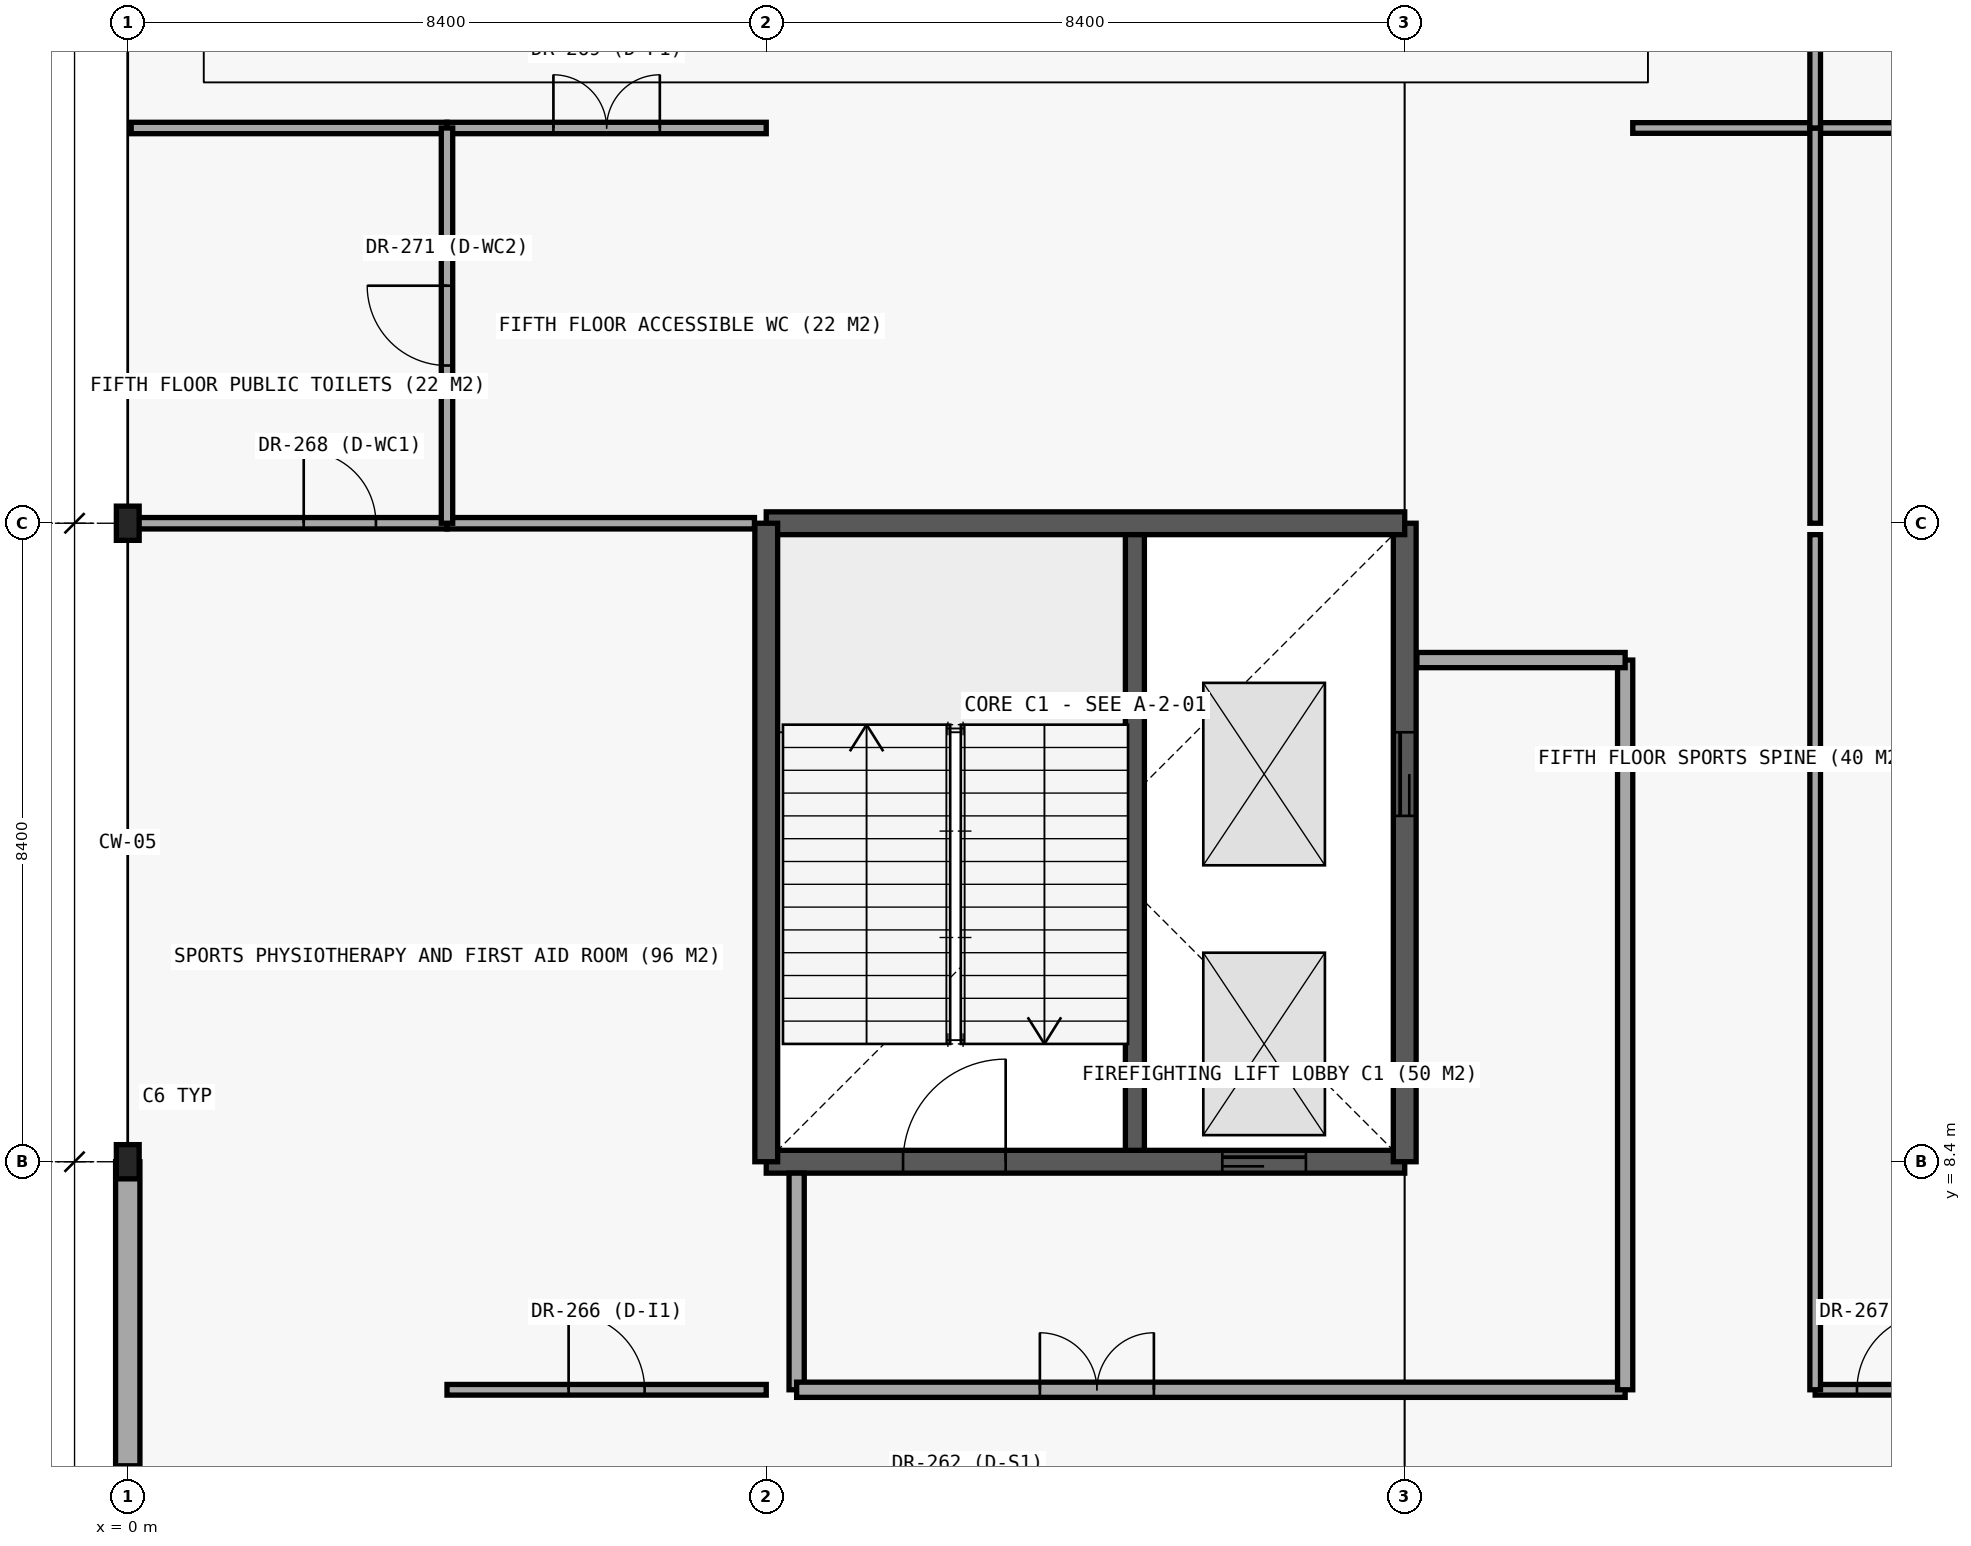
"""IFC4 building model, lengths in metres.
Left out: names, types, materials, properties, quantities, classifications, styles, units other than length and angle.
Written with IfcOpenShell. Run it as: python <this file> out.ifc"""

import sys

from ifc_helpers import new_model, si_unit, direction, frame, frame_2d, origin, origin_2d, place, context, subcontext, project, spatial, rectangle, i_section, extrude, element, fill, save


model = new_model("IFC4")
c1 = context("Model", 3, precision=1e-05, world=origin(), true_north=direction((0.0, 1.0)))
c2 = subcontext(c1, "Body", "Model", "MODEL_VIEW")
j1 = project(units=[si_unit("LENGTHUNIT", "METRE"), si_unit("PLANEANGLEUNIT", "RADIAN")], contexts=[c1])
p1 = place(None, origin())
s1 = spatial("IfcSite", under=j1, at=p1, CompositionType="ELEMENT")
p2 = place(p1, origin())
s2 = spatial("IfcBuilding", under=s1, at=p2, CompositionType="ELEMENT")
p3 = place(p2, frame((0.0, 0.0, 21.6)))
s3 = spatial("IfcBuildingStorey", under=s2, at=p3, CompositionType="ELEMENT", Elevation=21.6)
p4 = place(p3, frame((8.4, 8.4, 0.0), z_axis=(0.0, 0.0, 1.0), x_axis=(1.0, 0.0, 0.0)))
e1 = element("IfcWall", 1, at=p4, inside=s3, PredefinedType="SHEAR", context=c2, shape_type="SweptSolid", body=[
    extrude(rectangle(XDim=8.4, YDim=0.3, at=frame_2d((4.2, 0.0))), origin(), (0.0, 0.0, 1.0), 4.8),
])
p5 = place(p4, frame((1.8, 0.0, 0.0)))
e2 = element("IfcOpeningElement", 2, at=p5, cuts=e1, PredefinedType="OPENING", context=c2, shape_type="SweptSolid", body=[
    extrude(rectangle(XDim=1.35, YDim=2.2, at=frame_2d((0.675, 1.1))), frame((0.0, 0.16, 0.0), z_axis=(0.0, -1.0, 0.0), x_axis=(1.0, 0.0, 0.0)), (0.0, 0.0, 1.0), 0.32),
])
p6 = place(p4, frame((6.0, 0.0, 0.0)))
e3 = element("IfcOpeningElement", 3, at=p6, cuts=e1, PredefinedType="OPENING", context=c2, shape_type="SweptSolid", body=[
    extrude(rectangle(XDim=1.1, YDim=2.2, at=frame_2d((0.55, 1.1))), frame((0.0, 0.16, 0.0), z_axis=(0.0, -1.0, 0.0), x_axis=(1.0, 0.0, 0.0)), (0.0, 0.0, 1.0), 0.32),
])
p7 = place(p3, frame((16.8, 8.4, 0.0), z_axis=(0.0, 0.0, 1.0), x_axis=(0.0, 1.0, 0.0)))
e4 = element("IfcWall", 4, at=p7, inside=s3, PredefinedType="SHEAR", context=c2, shape_type="SweptSolid", body=[
    extrude(rectangle(XDim=8.4, YDim=0.3, at=frame_2d((4.2, 0.0))), origin(), (0.0, 0.0, 1.0), 4.8),
])
p8 = place(p7, frame((4.55, 0.0, 0.0)))
e5 = element("IfcOpeningElement", 5, at=p8, cuts=e4, PredefinedType="OPENING", context=c2, shape_type="SweptSolid", body=[
    extrude(rectangle(XDim=1.1, YDim=2.2, at=frame_2d((0.55, 1.1))), frame((0.0, 0.16, 0.0), z_axis=(0.0, -1.0, 0.0), x_axis=(1.0, 0.0, 0.0)), (0.0, 0.0, 1.0), 0.32),
])
for number, where, z_axis, x_axis in (
    (6, (16.8, 16.8, 0.0), (0.0, 0.0, 1.0), (-1.0, 0.0, 0.0)),
    (7, (8.4, 16.8, 0.0), (0.0, 0.0, 1.0), (0.0, -1.0, 0.0)),
):
    element("IfcWall", number, at=place(p3, frame(where, z_axis=z_axis, x_axis=x_axis)), inside=s3, PredefinedType="SHEAR", context=c2, shape_type="SweptSolid", body=[
        extrude(rectangle(XDim=8.4, YDim=0.3, at=frame_2d((4.2, 0.0))), origin(), (0.0, 0.0, 1.0), 4.8),
    ])
p9 = place(p3, frame((13.25, 8.55, 0.0), z_axis=(0.0, 0.0, 1.0), x_axis=(0.0, 1.0, 0.0)))
e8 = element("IfcWall", 8, at=p9, inside=s3, PredefinedType="SHEAR", context=c2, shape_type="SweptSolid", body=[
    extrude(rectangle(XDim=8.1, YDim=0.25, at=frame_2d((4.05, 0.0))), origin(), (0.0, 0.0, 1.0), 4.8),
])
for number, where, z_axis, x_axis in (
    (9, (0.0, 8.4, 0.0), (0.0, 0.0, 1.0), (1.0, 0.0, 0.0)),
    (10, (0.0, 16.8, 0.0), (0.0, 0.0, 1.0), (1.0, 0.0, 0.0)),
):
    element("IfcColumn", number, at=place(p3, frame(where, z_axis=z_axis, x_axis=x_axis)), inside=s3, PredefinedType="COLUMN", context=c2, shape_type="SweptSolid", body=[
        extrude(i_section(OverallWidth=0.3, OverallDepth=0.45, WebThickness=0.014, FlangeThickness=0.026, FilletRadius=0.027, at=origin_2d()), origin(), (0.0, 0.0, 1.0), 4.8),
    ])
p10 = place(p3, frame((0.0, 8.4, 0.0), z_axis=(0.0, 0.0, 1.0), x_axis=(0.0, -1.0, 0.0)))
e11 = element("IfcWall", 11, at=p10, inside=s3, PredefinedType="STANDARD", context=c2, shape_type="SweptSolid", body=[
    extrude(rectangle(XDim=4.2, YDim=0.32, at=frame_2d((2.1, 0.0))), origin(), (0.0, 0.0, 1.0), 4.22),
])
p11 = place(p3, frame((8.8, 5.4, 0.0), z_axis=(0.0, 0.0, 1.0), x_axis=(0.0, 1.0, 0.0)))
e12 = element("IfcWall", 12, at=p11, inside=s3, PredefinedType="PARTITIONING", context=c2, shape_type="SweptSolid", body=[
    extrude(rectangle(XDim=2.85, YDim=0.2, at=frame_2d((1.425, 0.0))), origin(), (0.0, 0.0, 1.0), 4.12),
])
p12 = place(p3, frame((8.8, 5.4, 0.0), z_axis=(0.0, 0.0, 1.0), x_axis=(1.0, 0.0, 0.0)))
e13 = element("IfcWall", 13, at=p12, inside=s3, PredefinedType="PARTITIONING", context=c2, shape_type="SweptSolid", body=[
    extrude(rectangle(XDim=10.9, YDim=0.2, at=frame_2d((5.45, 0.0))), origin(), (0.0, 0.0, 1.0), 4.12),
])
p13 = place(p12, frame((3.2, 0.0, 0.0)))
e14 = element("IfcOpeningElement", 14, at=p13, cuts=e13, PredefinedType="OPENING", context=c2, shape_type="SweptSolid", body=[
    extrude(rectangle(XDim=1.5, YDim=2.2, at=frame_2d((0.75, 1.1))), frame((0.0, 0.11, 0.0), z_axis=(0.0, -1.0, 0.0), x_axis=(1.0, 0.0, 0.0)), (0.0, 0.0, 1.0), 0.22),
])
p14 = place(p3, frame((19.7, 5.4, 0.0), z_axis=(0.0, 0.0, 1.0), x_axis=(0.0, 1.0, 0.0)))
e15 = element("IfcWall", 15, at=p14, inside=s3, PredefinedType="PARTITIONING", context=c2, shape_type="SweptSolid", body=[
    extrude(rectangle(XDim=9.6, YDim=0.2, at=frame_2d((4.8, 0.0))), origin(), (0.0, 0.0, 1.0), 4.12),
])
p15 = place(p3, frame((16.96, 15.0, 0.0), z_axis=(0.0, 0.0, 1.0), x_axis=(1.0, 0.0, 0.0)))
e16 = element("IfcWall", 16, at=p15, inside=s3, PredefinedType="PARTITIONING", context=c2, shape_type="SweptSolid", body=[
    extrude(rectangle(XDim=2.74, YDim=0.2, at=frame_2d((1.37, 0.0))), origin(), (0.0, 0.0, 1.0), 4.12),
])
p16 = place(p3, frame((4.2, 5.4, 0.0), z_axis=(0.0, 0.0, 1.0), x_axis=(1.0, 0.0, 0.0)))
e17 = element("IfcWall", 17, at=p16, inside=s3, PredefinedType="PARTITIONING", context=c2, shape_type="SweptSolid", body=[
    extrude(rectangle(XDim=4.2, YDim=0.14, at=frame_2d((2.1, 0.0))), origin(), (0.0, 0.0, 1.0), 4.1),
])
p17 = place(p16, frame((1.6, 0.0, 0.0)))
e18 = element("IfcOpeningElement", 18, at=p17, cuts=e17, PredefinedType="OPENING", context=c2, shape_type="SweptSolid", body=[
    extrude(rectangle(XDim=1.0, YDim=2.15, at=frame_2d((0.5, 1.075))), frame((0.0, 0.08, 0.0), z_axis=(0.0, -1.0, 0.0), x_axis=(1.0, 0.0, 0.0)), (0.0, 0.0, 1.0), 0.16),
])
p18 = place(p3, frame((22.2, 5.4, 0.0), z_axis=(0.0, 0.0, 1.0), x_axis=(1.0, 0.0, 0.0)))
e19 = element("IfcWall", 19, at=p18, inside=s3, PredefinedType="PARTITIONING", context=c2, shape_type="SweptSolid", body=[
    extrude(rectangle(XDim=11.4, YDim=0.14, at=frame_2d((5.7, 0.0))), origin(), (0.0, 0.0, 1.0), 4.1),
])
p19 = place(p18, frame((0.55, 0.0, 0.0)))
e20 = element("IfcOpeningElement", 20, at=p19, cuts=e19, PredefinedType="OPENING", context=c2, shape_type="SweptSolid", body=[
    extrude(rectangle(XDim=1.0, YDim=2.15, at=frame_2d((0.5, 1.075))), frame((0.0, 0.08, 0.0), z_axis=(0.0, -1.0, 0.0), x_axis=(1.0, 0.0, 0.0)), (0.0, 0.0, 1.0), 0.16),
])
p20 = place(p3, frame((0.045, 16.8, 0.0), z_axis=(0.0, 0.0, 1.0), x_axis=(1.0, 0.0, 0.0)))
e21 = element("IfcWall", 21, at=p20, inside=s3, PredefinedType="PARTITIONING", context=c2, shape_type="SweptSolid", body=[
    extrude(rectangle(XDim=4.155, YDim=0.15, at=frame_2d((2.078, 0.0))), origin(), (0.0, 0.0, 1.0), 3.9),
])
p21 = place(p20, frame((2.27, 0.0, 0.0)))
e22 = element("IfcOpeningElement", 22, at=p21, cuts=e21, PredefinedType="OPENING", context=c2, shape_type="SweptSolid", body=[
    extrude(rectangle(XDim=0.95, YDim=2.1, at=frame_2d((0.475, 1.05))), frame((0.0, 0.085, 0.0), z_axis=(0.0, -1.0, 0.0), x_axis=(1.0, 0.0, 0.0)), (0.0, 0.0, 1.0), 0.17),
])
p22 = place(p3, frame((4.2, 16.8, 0.0), z_axis=(0.0, 0.0, 1.0), x_axis=(1.0, 0.0, 0.0)))
e23 = element("IfcWall", 23, at=p22, inside=s3, PredefinedType="PARTITIONING", context=c2, shape_type="SweptSolid", body=[
    extrude(rectangle(XDim=4.045, YDim=0.15, at=frame_2d((2.022, 0.0))), origin(), (0.0, 0.0, 1.0), 3.9),
])
p23 = place(p3, frame((0.045, 22.0, 0.0), z_axis=(0.0, 0.0, 1.0), x_axis=(1.0, 0.0, 0.0)))
e24 = element("IfcWall", 24, at=p23, inside=s3, PredefinedType="PARTITIONING", context=c2, shape_type="SweptSolid", body=[
    extrude(rectangle(XDim=4.155, YDim=0.15, at=frame_2d((2.078, 0.0))), origin(), (0.0, 0.0, 1.0), 4.1),
])
p24 = place(p3, frame((4.2, 22.0, 0.0), z_axis=(0.0, 0.0, 1.0), x_axis=(1.0, 0.0, 0.0)))
e25 = element("IfcWall", 25, at=p24, inside=s3, PredefinedType="PARTITIONING", context=c2, shape_type="SweptSolid", body=[
    extrude(rectangle(XDim=4.2, YDim=0.15, at=frame_2d((2.1, 0.0))), origin(), (0.0, 0.0, 1.0), 4.1),
])
p25 = place(p24, frame((1.4, 0.0, 0.0)))
e26 = element("IfcOpeningElement", 26, at=p25, cuts=e25, PredefinedType="OPENING", context=c2, shape_type="SweptSolid", body=[
    extrude(rectangle(XDim=1.4, YDim=2.25, at=frame_2d((0.7, 1.125))), frame((0.0, 0.085, 0.0), z_axis=(0.0, -1.0, 0.0), x_axis=(1.0, 0.0, 0.0)), (0.0, 0.0, 1.0), 0.17),
])
p26 = place(p3, frame((19.8, 22.0, 0.0), z_axis=(0.0, 0.0, 1.0), x_axis=(1.0, 0.0, 0.0)))
e27 = element("IfcWall", 27, at=p26, inside=s3, PredefinedType="PARTITIONING", context=c2, shape_type="SweptSolid", body=[
    extrude(rectangle(XDim=2.4, YDim=0.14, at=frame_2d((1.2, 0.0))), origin(), (0.0, 0.0, 1.0), 4.1),
])
p27 = place(p3, frame((22.2, 22.0, 0.0), z_axis=(0.0, 0.0, 1.0), x_axis=(1.0, 0.0, 0.0)))
e28 = element("IfcWall", 28, at=p27, inside=s3, PredefinedType="PARTITIONING", context=c2, shape_type="SweptSolid", body=[
    extrude(rectangle(XDim=11.4, YDim=0.14, at=frame_2d((5.7, 0.0))), origin(), (0.0, 0.0, 1.0), 4.1),
])
p28 = place(p3, frame((4.2, 16.8, 0.0), z_axis=(0.0, 0.0, 1.0), x_axis=(0.0, 1.0, 0.0)))
e29 = element("IfcWall", 29, at=p28, inside=s3, PredefinedType="PARTITIONING", context=c2, shape_type="SweptSolid", body=[
    extrude(rectangle(XDim=5.2, YDim=0.15, at=frame_2d((2.6, 0.0))), origin(), (0.0, 0.0, 1.0), 4.1),
])
p29 = place(p28, frame((2.075, 0.0, 0.0)))
e30 = element("IfcOpeningElement", 30, at=p29, cuts=e29, PredefinedType="OPENING", context=c2, shape_type="SweptSolid", body=[
    extrude(rectangle(XDim=1.05, YDim=2.15, at=frame_2d((0.525, 1.075))), frame((0.0, 0.085, 0.0), z_axis=(0.0, -1.0, 0.0), x_axis=(1.0, 0.0, 0.0)), (0.0, 0.0, 1.0), 0.17),
])
p30 = place(p3, frame((22.2, 5.4, 0.0), z_axis=(0.0, 0.0, 1.0), x_axis=(0.0, 1.0, 0.0)))
e31 = element("IfcWall", 31, at=p30, inside=s3, PredefinedType="PARTITIONING", context=c2, shape_type="SweptSolid", body=[
    extrude(rectangle(XDim=11.25, YDim=0.14, at=frame_2d((5.625, 0.0))), origin(), (0.0, 0.0, 1.0), 4.1),
])
p31 = place(p3, frame((22.2, 16.8, 0.0), z_axis=(0.0, 0.0, 1.0), x_axis=(0.0, 1.0, 0.0)))
e32 = element("IfcWall", 32, at=p31, inside=s3, PredefinedType="PARTITIONING", context=c2, shape_type="SweptSolid", body=[
    extrude(rectangle(XDim=5.2, YDim=0.14, at=frame_2d((2.6, 0.0))), origin(), (0.0, 0.0, 1.0), 4.1),
])
p32 = place(p3, frame((22.2, 22.0, 0.0), z_axis=(0.0, 0.0, 1.0), x_axis=(0.0, 1.0, 0.0)))
e33 = element("IfcWall", 33, at=p32, inside=s3, PredefinedType="PARTITIONING", context=c2, shape_type="SweptSolid", body=[
    extrude(rectangle(XDim=11.6, YDim=0.14, at=frame_2d((5.8, 0.0))), origin(), (0.0, 0.0, 1.0), 4.1),
])
p33 = place(p32, frame((5.1, 0.0, 0.0)))
e34 = element("IfcOpeningElement", 34, at=p33, cuts=e33, PredefinedType="OPENING", context=c2, shape_type="SweptSolid", body=[
    extrude(rectangle(XDim=1.4, YDim=2.25, at=frame_2d((0.7, 1.125))), frame((0.0, 0.08, 0.0), z_axis=(0.0, -1.0, 0.0), x_axis=(1.0, 0.0, 0.0)), (0.0, 0.0, 1.0), 0.16),
])
p34 = place(p5, origin())
e35 = element("IfcDoor", 35, at=p34, inside=s3, OperationType="SINGLE_SWING_RIGHT", PredefinedType="DOOR", context=c2, shape_type="SweptSolid", body=[
    extrude(rectangle(XDim=1.35, YDim=2.2, at=frame_2d((0.675, 1.1))), frame((0.0, 0.025, 0.0), z_axis=(0.0, -1.0, 0.0), x_axis=(1.0, 0.0, 0.0)), (0.0, 0.0, 1.0), 0.05),
])
fill(e2, e35)
p35 = place(p6, origin())
e36 = element("IfcDoor", 36, at=p35, inside=s3, OperationType="SLIDING_TO_LEFT", PredefinedType="DOOR", context=c2, shape_type="SweptSolid", body=[
    extrude(rectangle(XDim=1.1, YDim=2.2, at=frame_2d((0.55, 1.1))), frame((0.0, 0.025, 0.0), z_axis=(0.0, -1.0, 0.0), x_axis=(1.0, 0.0, 0.0)), (0.0, 0.0, 1.0), 0.05),
])
fill(e3, e36)
p36 = place(p8, origin())
e37 = element("IfcDoor", 37, at=p36, inside=s3, OperationType="SLIDING_TO_RIGHT", PredefinedType="DOOR", context=c2, shape_type="SweptSolid", body=[
    extrude(rectangle(XDim=1.1, YDim=2.2, at=frame_2d((0.55, 1.1))), frame((0.0, 0.025, 0.0), z_axis=(0.0, -1.0, 0.0), x_axis=(1.0, 0.0, 0.0)), (0.0, 0.0, 1.0), 0.05),
])
fill(e5, e37)
p37 = place(p13, origin())
e38 = element("IfcDoor", 38, at=p37, inside=s3, OperationType="DOUBLE_DOOR_SINGLE_SWING", PredefinedType="DOOR", context=c2, shape_type="SweptSolid", body=[
    extrude(rectangle(XDim=1.5, YDim=2.2, at=frame_2d((0.75, 1.1))), frame((0.0, 0.025, 0.0), z_axis=(0.0, -1.0, 0.0), x_axis=(1.0, 0.0, 0.0)), (0.0, 0.0, 1.0), 0.05),
])
fill(e14, e38)
p38 = place(p17, origin())
e39 = element("IfcDoor", 39, at=p38, inside=s3, OperationType="SINGLE_SWING_LEFT", PredefinedType="DOOR", context=c2, shape_type="SweptSolid", body=[
    extrude(rectangle(XDim=1.0, YDim=2.15, at=frame_2d((0.5, 1.075))), frame((0.0, 0.025, 0.0), z_axis=(0.0, -1.0, 0.0), x_axis=(1.0, 0.0, 0.0)), (0.0, 0.0, 1.0), 0.05),
])
fill(e18, e39)
p39 = place(p19, origin())
e40 = element("IfcDoor", 40, at=p39, inside=s3, OperationType="SINGLE_SWING_RIGHT", PredefinedType="DOOR", context=c2, shape_type="SweptSolid", body=[
    extrude(rectangle(XDim=1.0, YDim=2.15, at=frame_2d((0.5, 1.075))), frame((0.0, 0.025, 0.0), z_axis=(0.0, -1.0, 0.0), x_axis=(1.0, 0.0, 0.0)), (0.0, 0.0, 1.0), 0.05),
])
fill(e20, e40)
p40 = place(p21, origin())
e41 = element("IfcDoor", 41, at=p40, inside=s3, OperationType="SINGLE_SWING_LEFT", PredefinedType="DOOR", context=c2, shape_type="SweptSolid", body=[
    extrude(rectangle(XDim=0.95, YDim=2.1, at=frame_2d((0.475, 1.05))), frame((0.0, 0.025, 0.0), z_axis=(0.0, -1.0, 0.0), x_axis=(1.0, 0.0, 0.0)), (0.0, 0.0, 1.0), 0.05),
])
fill(e22, e41)
p41 = place(p25, origin())
e42 = element("IfcDoor", 42, at=p41, inside=s3, OperationType="DOUBLE_DOOR_SINGLE_SWING", PredefinedType="DOOR", context=c2, shape_type="SweptSolid", body=[
    extrude(rectangle(XDim=1.4, YDim=2.25, at=frame_2d((0.7, 1.125))), frame((0.0, 0.025, 0.0), z_axis=(0.0, -1.0, 0.0), x_axis=(1.0, 0.0, 0.0)), (0.0, 0.0, 1.0), 0.05),
])
fill(e26, e42)
p42 = place(p29, origin())
e43 = element("IfcDoor", 43, at=p42, inside=s3, OperationType="SINGLE_SWING_RIGHT", PredefinedType="DOOR", context=c2, shape_type="SweptSolid", body=[
    extrude(rectangle(XDim=1.05, YDim=2.15, at=frame_2d((0.525, 1.075))), frame((0.0, 0.025, 0.0), z_axis=(0.0, -1.0, 0.0), x_axis=(1.0, 0.0, 0.0)), (0.0, 0.0, 1.0), 0.05),
])
fill(e30, e43)
save(model, sys.argv[1])
